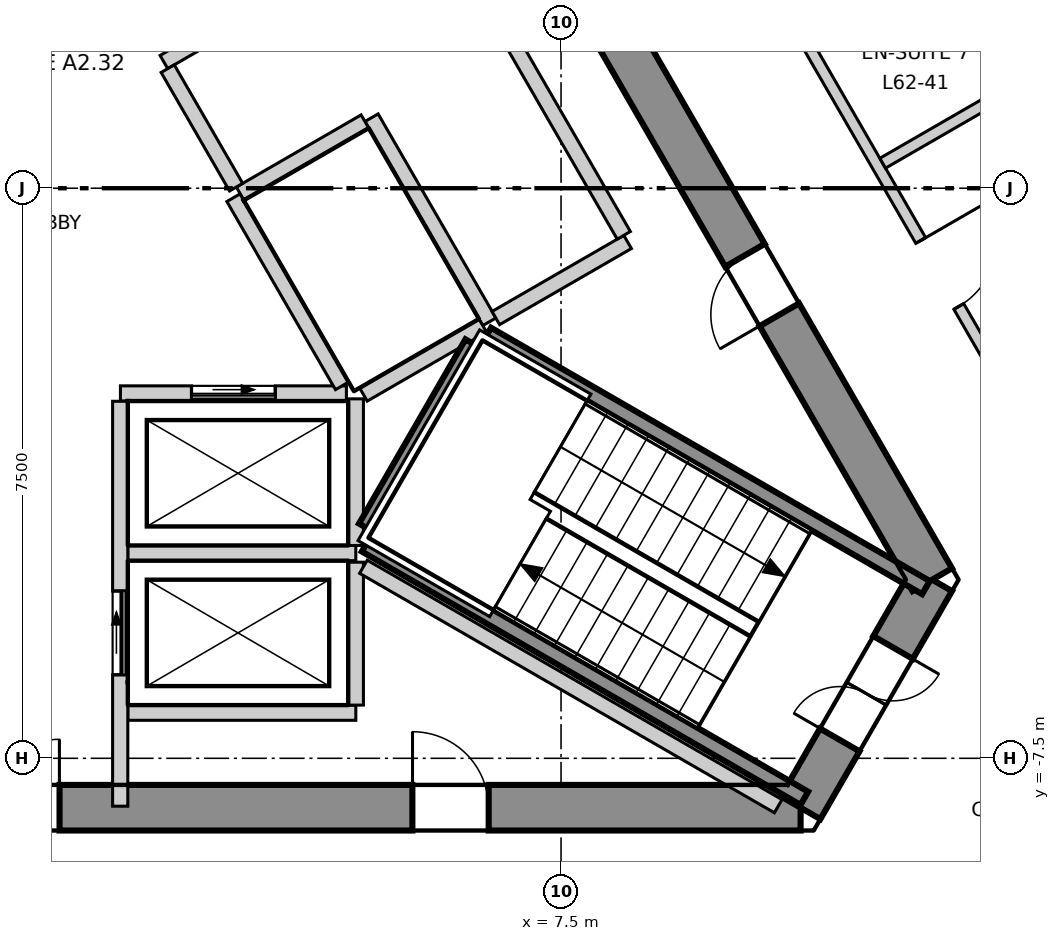
"""IFC4 building model, lengths in metres.
Left out: names, types, materials, properties, quantities, classifications, styles, units other than length and angle.
Written with IfcOpenShell. Run it as: python <this file> out.ifc"""

import sys

from ifc_helpers import new_model, si_unit, direction, frame, frame_2d, origin, place, context, subcontext, project, spatial, polyline, rectangle, outline, extrude, element, fill, save


model = new_model("IFC4")
c1 = context("Model", 3, precision=1e-05, world=origin(), true_north=direction((0.0, 1.0)))
c2 = subcontext(c1, "Body", "Model", "MODEL_VIEW")
j1 = project(units=[si_unit("LENGTHUNIT", "METRE"), si_unit("PLANEANGLEUNIT", "RADIAN")], contexts=[c1])
p1 = place(None, origin())
s1 = spatial("IfcSite", under=j1, at=p1, CompositionType="ELEMENT")
p2 = place(p1, origin())
s2 = spatial("IfcBuilding", under=s1, at=p2, CompositionType="ELEMENT")
p3 = place(p2, frame((0.0, 0.0, 268.3)))
s3 = spatial("IfcBuildingStorey", under=s2, at=p3, CompositionType="ELEMENT", Elevation=268.3)
p4 = place(p3, frame((-10.652, -8.15, -0.3), z_axis=(0.0, 0.0, 1.0), x_axis=(1.0, 0.0, 0.0)))
e1 = element("IfcWall", 1, at=p4, inside=s3, PredefinedType="SHEAR", context=c2, shape_type="SweptSolid", body=[
    extrude(outline(polyline([(-0.173, -0.3), (1.795, -0.3), (3.763, -0.3), (5.731, -0.3), (7.7, -0.3), (9.668, -0.3), (11.636, -0.3), (13.604, -0.3), (15.573, -0.3), (17.541, -0.3), (19.509, -0.3), (21.477, -0.3), (21.131, 0.3), (19.226, 0.3), (17.321, 0.3), (15.415, 0.3), (13.51, 0.3), (11.605, 0.3), (9.699, 0.3), (7.794, 0.3), (5.889, 0.3), (3.984, 0.3), (2.078, 0.3), (0.173, 0.3), (-0.173, -0.3)])), origin(), (0.0, 0.0, 1.0), 3.6),
])
p5 = place(p4, frame((9.752, 0.0, 0.3)))
e2 = element("IfcOpeningElement", 2, at=p5, cuts=e1, PredefinedType="OPENING", context=c2, shape_type="SweptSolid", body=[
    extrude(rectangle(XDim=1.8, YDim=2.1, at=frame_2d((0.9, 1.05))), frame((0.0, 0.31, 0.0), z_axis=(0.0, -1.0, 0.0), x_axis=(1.0, 0.0, 0.0)), (0.0, 0.0, 1.0), 0.62),
])
p6 = place(p4, frame((4.026, 0.0, 0.3)))
e3 = element("IfcOpeningElement", 3, at=p6, cuts=e1, PredefinedType="OPENING", context=c2, shape_type="SweptSolid", body=[
    extrude(rectangle(XDim=0.9, YDim=2.1, at=frame_2d((0.45, 1.05))), frame((0.0, 0.31, 0.0), z_axis=(0.0, -1.0, 0.0), x_axis=(1.0, 0.0, 0.0)), (0.0, 0.0, 1.0), 0.62),
])
p7 = place(p4, frame((16.198, 0.0, 0.3)))
e4 = element("IfcOpeningElement", 4, at=p7, cuts=e1, PredefinedType="OPENING", context=c2, shape_type="SweptSolid", body=[
    extrude(rectangle(XDim=1.0, YDim=2.1, at=frame_2d((0.5, 1.05))), frame((0.0, 0.31, 0.0), z_axis=(0.0, -1.0, 0.0), x_axis=(1.0, 0.0, 0.0)), (0.0, 0.0, 1.0), 0.62),
])
p8 = place(p3, frame((10.652, -8.15, -0.3), z_axis=(0.0, 0.0, 1.0), x_axis=(0.49997462182, 0.866040055388, 0.0)))
e5 = element("IfcWall", 5, at=p8, inside=s3, PredefinedType="SHEAR", context=c2, shape_type="SweptSolid", body=[
    extrude(outline(polyline([(-0.173, -0.3), (1.732, -0.301), (3.638, -0.301), (3.291, 0.3), (1.732, 0.3), (0.173, 0.3), (-0.173, -0.3)])), origin(), (0.0, 0.0, 1.0), 3.6),
])
p9 = place(p8, frame((1.032, 0.0, 0.3)))
e6 = element("IfcOpeningElement", 6, at=p9, cuts=e5, PredefinedType="OPENING", context=c2, shape_type="SweptSolid", body=[
    extrude(rectangle(XDim=1.4, YDim=2.1, at=frame_2d((0.7, 1.05))), frame((0.0, 0.31, 0.0), z_axis=(0.0, -1.0, 0.0), x_axis=(1.0, 0.0, 0.0)), (0.0, 0.0, 1.0), 0.621),
])
p10 = place(p3, frame((12.384, -5.15, -0.3), z_axis=(0.0, 0.0, 1.0), x_axis=(-0.500000539815, 0.866025092122, 0.0)))
e7 = element("IfcWall", 7, at=p10, inside=s3, PredefinedType="SHEAR", context=c2, shape_type="SweptSolid", body=[
    extrude(outline(polyline([(-0.173, -0.301), (1.795, -0.301), (3.763, -0.301), (5.731, -0.301), (7.7, -0.301), (9.668, -0.301), (11.636, -0.301), (13.604, -0.3), (15.573, -0.3), (17.541, -0.3), (19.509, -0.3), (21.477, -0.3), (21.131, 0.3), (19.226, 0.3), (17.321, 0.3), (15.415, 0.3), (13.51, 0.3), (11.605, 0.3), (9.699, 0.3), (7.794, 0.3), (5.889, 0.3), (3.984, 0.3), (2.078, 0.3), (0.173, 0.3), (-0.173, -0.301)])), origin(), (0.0, 0.0, 1.0), 3.6),
])
p11 = place(p10, frame((15.627, 0.0, 0.3)))
e8 = element("IfcOpeningElement", 8, at=p11, cuts=e7, PredefinedType="OPENING", context=c2, shape_type="SweptSolid", body=[
    extrude(rectangle(XDim=0.9, YDim=2.1, at=frame_2d((0.45, 1.05))), frame((0.0, 0.31, 0.0), z_axis=(0.0, -1.0, 0.0), x_axis=(1.0, 0.0, 0.0)), (0.0, 0.0, 1.0), 0.621),
])
p12 = place(p10, frame((4.026, 0.0, 0.3)))
e9 = element("IfcOpeningElement", 9, at=p12, cuts=e7, PredefinedType="OPENING", context=c2, shape_type="SweptSolid", body=[
    extrude(rectangle(XDim=0.9, YDim=2.1, at=frame_2d((0.45, 1.05))), frame((0.0, 0.31, 0.0), z_axis=(0.0, -1.0, 0.0), x_axis=(1.0, 0.0, 0.0)), (0.0, 0.0, 1.0), 0.621),
])
p13 = place(p3, frame((26.205, -12.154, 0.0), z_axis=(0.0, 0.0, 1.0), x_axis=(-0.49999909388, 0.866025926932, 0.0)))
e10 = element("IfcWall", 10, at=p13, inside=s3, PredefinedType="ELEMENTEDWALL", context=c2, shape_type="SweptSolid", body=[
    extrude(rectangle(XDim=47.236, YDim=0.2, at=frame_2d((23.618, 0.0))), origin(), (0.0, 0.0, 1.0), 3.3),
])
p14 = place(p13, frame((2.243, 0.0, 0.9)))
e11 = element("IfcOpeningElement", 11, at=p14, cuts=e10, PredefinedType="OPENING", context=c2, shape_type="SweptSolid", body=[
    extrude(rectangle(XDim=3.7, YDim=2.2, at=frame_2d((1.85, 1.1))), frame((0.0, 0.11, 0.0), z_axis=(0.0, -1.0, 0.0), x_axis=(1.0, 0.0, 0.0)), (0.0, 0.0, 1.0), 0.22),
])
p15 = place(p13, frame((7.825, 0.0, 0.9)))
e12 = element("IfcOpeningElement", 12, at=p15, cuts=e10, PredefinedType="OPENING", context=c2, shape_type="SweptSolid", body=[
    extrude(rectangle(XDim=3.7, YDim=2.2, at=frame_2d((1.85, 1.1))), frame((0.0, 0.11, 0.0), z_axis=(0.0, -1.0, 0.0), x_axis=(1.0, 0.0, 0.0)), (0.0, 0.0, 1.0), 0.22),
])
p16 = place(p13, frame((13.406, 0.0, 0.9)))
e13 = element("IfcOpeningElement", 13, at=p16, cuts=e10, PredefinedType="OPENING", context=c2, shape_type="SweptSolid", body=[
    extrude(rectangle(XDim=3.7, YDim=2.2, at=frame_2d((1.85, 1.1))), frame((0.0, 0.11, 0.0), z_axis=(0.0, -1.0, 0.0), x_axis=(1.0, 0.0, 0.0)), (0.0, 0.0, 1.0), 0.22),
])
p17 = place(p13, frame((18.987, 0.0, 0.9)))
e14 = element("IfcOpeningElement", 14, at=p17, cuts=e10, PredefinedType="OPENING", context=c2, shape_type="SweptSolid", body=[
    extrude(rectangle(XDim=3.7, YDim=2.2, at=frame_2d((1.85, 1.1))), frame((0.0, 0.11, 0.0), z_axis=(0.0, -1.0, 0.0), x_axis=(1.0, 0.0, 0.0)), (0.0, 0.0, 1.0), 0.22),
])
p18 = place(p13, frame((24.569, 0.0, 0.9)))
e15 = element("IfcOpeningElement", 15, at=p18, cuts=e10, PredefinedType="OPENING", context=c2, shape_type="SweptSolid", body=[
    extrude(rectangle(XDim=3.7, YDim=2.2, at=frame_2d((1.85, 1.1))), frame((0.0, 0.11, 0.0), z_axis=(0.0, -1.0, 0.0), x_axis=(1.0, 0.0, 0.0)), (0.0, 0.0, 1.0), 0.22),
])
p19 = place(p13, frame((30.15, 0.0, 0.9)))
e16 = element("IfcOpeningElement", 16, at=p19, cuts=e10, PredefinedType="OPENING", context=c2, shape_type="SweptSolid", body=[
    extrude(rectangle(XDim=3.7, YDim=2.2, at=frame_2d((1.85, 1.1))), frame((0.0, 0.11, 0.0), z_axis=(0.0, -1.0, 0.0), x_axis=(1.0, 0.0, 0.0)), (0.0, 0.0, 1.0), 0.22),
])
p20 = place(p13, frame((35.732, 0.0, 0.9)))
e17 = element("IfcOpeningElement", 17, at=p20, cuts=e10, PredefinedType="OPENING", context=c2, shape_type="SweptSolid", body=[
    extrude(rectangle(XDim=3.7, YDim=2.2, at=frame_2d((1.85, 1.1))), frame((0.0, 0.11, 0.0), z_axis=(0.0, -1.0, 0.0), x_axis=(1.0, 0.0, 0.0)), (0.0, 0.0, 1.0), 0.22),
])
p21 = place(p13, frame((41.313, 0.0, 0.9)))
e18 = element("IfcOpeningElement", 18, at=p21, cuts=e10, PredefinedType="OPENING", context=c2, shape_type="SweptSolid", body=[
    extrude(rectangle(XDim=3.7, YDim=2.2, at=frame_2d((1.85, 1.1))), frame((0.0, 0.11, 0.0), z_axis=(0.0, -1.0, 0.0), x_axis=(1.0, 0.0, 0.0)), (0.0, 0.0, 1.0), 0.22),
])
p22 = place(p3, frame((0.075, 20.37, 0.0), z_axis=(0.0, 0.0, 1.0), x_axis=(0.499988971979, -0.866031770721, 0.0)))
e19 = element("IfcWall", 19, at=p22, inside=s3, PredefinedType="PARTITIONING", context=c2, shape_type="SweptSolid", body=[
    extrude(rectangle(XDim=35.207, YDim=0.15, at=frame_2d((17.604, 0.0))), origin(), (0.0, 0.0, 1.0), 3.3),
])
p23 = place(p22, frame((31.606, 0.0, 0.0)))
e20 = element("IfcOpeningElement", 20, at=p23, cuts=e19, PredefinedType="OPENING", context=c2, shape_type="SweptSolid", body=[
    extrude(rectangle(XDim=1.0, YDim=2.1, at=frame_2d((0.5, 1.05))), frame((0.0, 0.085, 0.0), z_axis=(0.0, -1.0, 0.0), x_axis=(1.0, 0.0, 0.0)), (0.0, 0.0, 1.0), 0.17),
])
p24 = place(p22, frame((24.316, 0.0, 0.0)))
e21 = element("IfcOpeningElement", 21, at=p24, cuts=e19, PredefinedType="OPENING", context=c2, shape_type="SweptSolid", body=[
    extrude(rectangle(XDim=1.0, YDim=2.1, at=frame_2d((0.5, 1.05))), frame((0.0, 0.085, 0.0), z_axis=(0.0, -1.0, 0.0), x_axis=(1.0, 0.0, 0.0)), (0.0, 0.0, 1.0), 0.17),
])
p25 = place(p22, frame((18.735, 0.0, 0.0)))
e22 = element("IfcOpeningElement", 22, at=p25, cuts=e19, PredefinedType="OPENING", context=c2, shape_type="SweptSolid", body=[
    extrude(rectangle(XDim=1.0, YDim=2.1, at=frame_2d((0.5, 1.05))), frame((0.0, 0.085, 0.0), z_axis=(0.0, -1.0, 0.0), x_axis=(1.0, 0.0, 0.0)), (0.0, 0.0, 1.0), 0.17),
])
p26 = place(p22, frame((8.154, 0.0, 0.0)))
e23 = element("IfcOpeningElement", 23, at=p26, cuts=e19, PredefinedType="OPENING", context=c2, shape_type="SweptSolid", body=[
    extrude(rectangle(XDim=1.0, YDim=2.1, at=frame_2d((0.5, 1.05))), frame((0.0, 0.085, 0.0), z_axis=(0.0, -1.0, 0.0), x_axis=(1.0, 0.0, 0.0)), (0.0, 0.0, 1.0), 0.17),
])
p27 = place(p22, frame((13.754, 0.0, 0.0)))
e24 = element("IfcOpeningElement", 24, at=p27, cuts=e19, PredefinedType="OPENING", context=c2, shape_type="SweptSolid", body=[
    extrude(rectangle(XDim=0.9, YDim=2.1, at=frame_2d((0.45, 1.05))), frame((0.0, 0.085, 0.0), z_axis=(0.0, -1.0, 0.0), x_axis=(1.0, 0.0, 0.0)), (0.0, 0.0, 1.0), 0.17),
])
p28 = place(p22, frame((11.554, 0.0, 0.0)))
e25 = element("IfcOpeningElement", 25, at=p28, cuts=e19, PredefinedType="OPENING", context=c2, shape_type="SweptSolid", body=[
    extrude(rectangle(XDim=0.9, YDim=2.1, at=frame_2d((0.45, 1.05))), frame((0.0, 0.085, 0.0), z_axis=(0.0, -1.0, 0.0), x_axis=(1.0, 0.0, 0.0)), (0.0, 0.0, 1.0), 0.17),
])
p29 = place(p22, frame((2.69, 0.0, 0.0)))
e26 = element("IfcOpeningElement", 26, at=p29, cuts=e19, PredefinedType="OPENING", context=c2, shape_type="SweptSolid", body=[
    extrude(rectangle(XDim=1.0, YDim=2.1, at=frame_2d((0.5, 1.05))), frame((0.0, 0.085, 0.0), z_axis=(0.0, -1.0, 0.0), x_axis=(1.0, 0.0, 0.0)), (0.0, 0.0, 1.0), 0.17),
])
p30 = place(p3, frame((11.732, 0.329, 0.0), z_axis=(0.0, 0.0, 1.0), x_axis=(0.866043575568, 0.499968524226, 0.0)))
e27 = element("IfcWall", 27, at=p30, inside=s3, PredefinedType="PARTITIONING", context=c2, shape_type="SweptSolid", body=[
    extrude(rectangle(XDim=6.212, YDim=0.15, at=frame_2d((3.106, 0.0))), origin(), (0.0, 0.0, 1.0), 3.3),
])
p31 = place(p3, frame((12.856, 3.633, 0.0), z_axis=(0.0, 0.0, 1.0), x_axis=(0.500023359282, -0.866011916877, 0.0)))
e28 = element("IfcWall", 28, at=p31, inside=s3, PredefinedType="PARTITIONING", context=c2, shape_type="SweptSolid", body=[
    extrude(rectangle(XDim=2.224, YDim=0.15, at=frame_2d((1.112, 0.0))), origin(), (0.0, 0.0, 1.0), 3.3),
])
for number, where, z_axis, x_axis in (
    (29, (1.8, -6.9, 0.0), (0.0, 0.0, 1.0), (1.0, 0.0, 0.0)),
    (30, (1.8, -4.8, 0.0), (0.0, 0.0, 1.0), (1.0, 0.0, 0.0)),
):
    element("IfcWall", number, at=place(p3, frame(where, z_axis=z_axis, x_axis=x_axis)), inside=s3, PredefinedType="SOLIDWALL", context=c2, shape_type="SweptSolid", body=[
        extrude(rectangle(XDim=3.0, YDim=0.2, at=frame_2d((1.5, 0.0))), origin(), (0.0, 0.0, 1.0), 3.3),
    ])
p32 = place(p3, frame((1.703, -2.7, 0.0), z_axis=(0.0, 0.0, 1.0), x_axis=(1.0, 0.0, 0.0)))
e31 = element("IfcWall", 31, at=p32, inside=s3, PredefinedType="SOLIDWALL", context=c2, shape_type="SweptSolid", body=[
    extrude(rectangle(XDim=2.973, YDim=0.2, at=frame_2d((1.487, 0.0))), origin(), (0.0, 0.0, 1.0), 3.3),
])
p33 = place(p32, frame((0.936, 0.0, 0.0)))
e32 = element("IfcOpeningElement", 32, at=p33, cuts=e31, PredefinedType="OPENING", context=c2, shape_type="SweptSolid", body=[
    extrude(rectangle(XDim=1.1, YDim=2.1, at=frame_2d((0.55, 1.05))), frame((0.0, 0.11, 0.0), z_axis=(0.0, -1.0, 0.0), x_axis=(1.0, 0.0, 0.0)), (0.0, 0.0, 1.0), 0.22),
])
p34 = place(p3, frame((3.19, -0.125, 0.0), z_axis=(0.0, 0.0, 1.0), x_axis=(0.499988658015, -0.866031951983, 0.0)))
e33 = element("IfcWall", 33, at=p34, inside=s3, PredefinedType="SOLIDWALL", context=c2, shape_type="SweptSolid", body=[
    extrude(rectangle(XDim=2.858, YDim=0.2, at=frame_2d((1.429, 0.0))), origin(), (0.0, 0.0, 1.0), 3.3),
])
p35 = place(p3, frame((1.7, -8.13, 0.0), z_axis=(0.0, 0.0, 1.0), x_axis=(0.0, 1.0, 0.0)))
e34 = element("IfcWall", 34, at=p35, inside=s3, PredefinedType="SOLIDWALL", context=c2, shape_type="SweptSolid", body=[
    extrude(rectangle(XDim=5.327, YDim=0.2, at=frame_2d((2.664, 0.0))), origin(), (0.0, 0.0, 1.0), 3.3),
])
p36 = place(p35, frame((1.73, 0.0, 0.0)))
e35 = element("IfcOpeningElement", 35, at=p36, cuts=e34, PredefinedType="OPENING", context=c2, shape_type="SweptSolid", body=[
    extrude(rectangle(XDim=1.1, YDim=2.1, at=frame_2d((0.55, 1.05))), frame((0.0, 0.11, 0.0), z_axis=(0.0, -1.0, 0.0), x_axis=(1.0, 0.0, 0.0)), (0.0, 0.0, 1.0), 0.22),
])
p37 = place(p3, frame((4.8, -6.8, 0.0), z_axis=(0.0, 0.0, 1.0), x_axis=(0.0, 1.0, 0.0)))
e36 = element("IfcWall", 36, at=p37, inside=s3, PredefinedType="SOLIDWALL", context=c2, shape_type="SweptSolid", body=[
    extrude(rectangle(XDim=1.88, YDim=0.2, at=frame_2d((0.94, 0.0))), origin(), (0.0, 0.0, 1.0), 3.3),
])
p38 = place(p3, frame((4.8, -4.7, 0.0), z_axis=(0.0, 0.0, 1.0), x_axis=(0.0, 1.0, 0.0)))
e37 = element("IfcWall", 37, at=p38, inside=s3, PredefinedType="SOLIDWALL", context=c2, shape_type="SweptSolid", body=[
    extrude(rectangle(XDim=1.929, YDim=0.2, at=frame_2d((0.964, 0.0))), origin(), (0.0, 0.0, 1.0), 3.3),
])
p39 = place(p3, frame((5.007, 0.928, 0.0), z_axis=(0.0, 0.0, 1.0), x_axis=(0.499899694197, -0.866083307622, 0.0)))
e38 = element("IfcWall", 38, at=p39, inside=s3, PredefinedType="SOLIDWALL", context=c2, shape_type="SweptSolid", body=[
    extrude(rectangle(XDim=3.1, YDim=0.2, at=frame_2d((1.55, 0.0))), origin(), (0.0, 0.0, 1.0), 3.3),
])
p40 = place(p3, frame((3.278, -0.071, 0.0), z_axis=(0.0, 0.0, 1.0), x_axis=(0.865784509405, 0.500417009377, 0.0)))
e39 = element("IfcWall", 39, at=p40, inside=s3, PredefinedType="SOLIDWALL", context=c2, shape_type="SweptSolid", body=[
    extrude(rectangle(XDim=1.896, YDim=0.2, at=frame_2d((0.948, 0.0))), origin(), (0.0, 0.0, 1.0), 3.3),
])
p41 = place(p3, frame((2.275, 1.66, 0.0), z_axis=(0.0, 0.0, 1.0), x_axis=(0.866013608182, 0.500020430026, 0.0)))
e40 = element("IfcWall", 40, at=p41, inside=s3, PredefinedType="SOLIDWALL", context=c2, shape_type="SweptSolid", body=[
    extrude(rectangle(XDim=4.35, YDim=0.2, at=frame_2d((2.175, 0.0))), origin(), (0.0, 0.0, 1.0), 3.3),
])
p42 = place(p3, frame((2.325, 1.573, 0.0), z_axis=(0.0, 0.0, 1.0), x_axis=(0.500004188491, -0.866022985545, 0.0)))
e41 = element("IfcWall", 41, at=p42, inside=s3, PredefinedType="SOLIDWALL", context=c2, shape_type="SweptSolid", body=[
    extrude(rectangle(XDim=1.8, YDim=0.2, at=frame_2d((0.9, 0.0))), origin(), (0.0, 0.0, 1.0), 3.3),
])
p43 = place(p3, frame((4.9, -2.714, 0.0), z_axis=(0.0, 0.0, 1.0), x_axis=(0.865846928409, 0.500309001083, 0.0)))
e42 = element("IfcWall", 42, at=p43, inside=s3, PredefinedType="SOLIDWALL", context=c2, shape_type="SweptSolid", body=[
    extrude(rectangle(XDim=1.813, YDim=0.2, at=frame_2d((0.907, 0.0))), origin(), (0.0, 0.0, 1.0), 3.3),
])
p44 = place(p3, frame((4.9, -4.98, 0.0), z_axis=(0.0, 0.0, 1.0), x_axis=(0.866074613031, -0.499914757397, 0.0)))
e43 = element("IfcWall", 43, at=p44, inside=s3, PredefinedType="SOLIDWALL", context=c2, shape_type="SweptSolid", body=[
    extrude(rectangle(XDim=6.301, YDim=0.2, at=frame_2d((3.15, 0.0))), origin(), (0.0, 0.0, 1.0), 3.3),
])
p45 = place(p3, frame((6.642, -1.708, 0.0), z_axis=(0.0, 0.0, 1.0), x_axis=(0.866043441391, 0.499968756647, 0.0)))
e44 = element("IfcWall", 44, at=p45, inside=s3, PredefinedType="SOLIDWALL", context=c2, shape_type="SweptSolid", body=[
    extrude(rectangle(XDim=2.002, YDim=0.2, at=frame_2d((1.001, 0.0))), origin(), (0.0, 0.0, 1.0), 3.3),
])
p46 = place(p3, frame((6.826, 1.978, 0.0), z_axis=(0.0, 0.0, 1.0), x_axis=(0.499990139034, -0.866031096941, 0.0)))
e45 = element("IfcWall", 45, at=p46, inside=s3, PredefinedType="SOLIDWALL", context=c2, shape_type="SweptSolid", body=[
    extrude(rectangle(XDim=3.0, YDim=0.2, at=frame_2d((1.5, 0.0))), origin(), (0.0, 0.0, 1.0), 3.3),
])
p47 = place(p3, frame((4.929, -4.693, 0.0), z_axis=(0.0, 0.0, 1.0), x_axis=(0.866005022404, -0.500035299925, 0.0)))
e46 = element("IfcWall", 46, at=p47, inside=s3, PredefinedType="SOLIDWALL", context=c2, shape_type="SweptSolid", body=[
    extrude(rectangle(XDim=6.665, YDim=0.2, at=frame_2d((3.333, 0.0))), origin(), (0.0, 0.0, 1.0), 3.3),
])
p48 = place(p3, frame((4.929, -4.462, 0.0), z_axis=(0.0, 0.0, 1.0), x_axis=(0.500200581029, 0.865909567298, 0.0)))
e47 = element("IfcWall", 47, at=p48, inside=s3, PredefinedType="SOLIDWALL", context=c2, shape_type="SweptSolid", body=[
    extrude(rectangle(XDim=2.799, YDim=0.2, at=frame_2d((1.399, 0.0))), origin(), (0.0, 0.0, 1.0), 3.3),
])
p49 = place(p3, frame((6.529, -1.922, 0.0), z_axis=(0.0, 0.0, 1.0), x_axis=(0.866068467981, -0.499925403204, 0.0)))
e48 = element("IfcWall", 48, at=p49, inside=s3, PredefinedType="SOLIDWALL", context=c2, shape_type="SweptSolid", body=[
    extrude(rectangle(XDim=6.665, YDim=0.2, at=frame_2d((3.332, 0.0))), origin(), (0.0, 0.0, 1.0), 3.3),
])
p50 = place(p33, origin())
e49 = element("IfcDoor", 49, at=p50, inside=s3, OperationType="SLIDING_TO_LEFT", PredefinedType="DOOR", context=c2, shape_type="SweptSolid", body=[
    extrude(rectangle(XDim=1.1, YDim=2.1, at=frame_2d((0.55, 1.05))), frame((0.0, 0.025, 0.0), z_axis=(0.0, -1.0, 0.0), x_axis=(1.0, 0.0, 0.0)), (0.0, 0.0, 1.0), 0.05),
])
fill(e32, e49)
p51 = place(p36, origin())
e50 = element("IfcDoor", 50, at=p51, inside=s3, OperationType="SLIDING_TO_LEFT", PredefinedType="DOOR", context=c2, shape_type="SweptSolid", body=[
    extrude(rectangle(XDim=1.1, YDim=2.1, at=frame_2d((0.55, 1.05))), frame((0.0, 0.025, 0.0), z_axis=(0.0, -1.0, 0.0), x_axis=(1.0, 0.0, 0.0)), (0.0, 0.0, 1.0), 0.05),
])
fill(e35, e50)
p52 = place(p24, origin())
e51 = element("IfcDoor", 51, at=p52, inside=s3, OperationType="SINGLE_SWING_RIGHT", PredefinedType="DOOR", context=c2, shape_type="SweptSolid", body=[
    extrude(rectangle(XDim=1.0, YDim=2.1, at=frame_2d((0.5, 1.05))), frame((0.0, 0.025, 0.0), z_axis=(0.0, -1.0, 0.0), x_axis=(1.0, 0.0, 0.0)), (0.0, 0.0, 1.0), 0.05),
])
fill(e21, e51)
p53 = place(p5, origin())
e52 = element("IfcDoor", 52, at=p53, inside=s3, OperationType="DOUBLE_DOOR_SINGLE_SWING", PredefinedType="DOOR", context=c2, shape_type="SweptSolid", body=[
    extrude(rectangle(XDim=1.8, YDim=2.1, at=frame_2d((0.9, 1.05))), frame((0.0, 0.025, 0.0), z_axis=(0.0, -1.0, 0.0), x_axis=(1.0, 0.0, 0.0)), (0.0, 0.0, 1.0), 0.05),
])
fill(e2, e52)
p54 = place(p9, origin())
e53 = element("IfcDoor", 53, at=p54, inside=s3, OperationType="DOUBLE_DOOR_SINGLE_SWING", PredefinedType="DOOR", context=c2, shape_type="SweptSolid", body=[
    extrude(rectangle(XDim=1.4, YDim=2.1, at=frame_2d((0.7, 1.05))), frame((0.0, 0.025, 0.0), z_axis=(0.0, -1.0, 0.0), x_axis=(1.0, 0.0, 0.0)), (0.0, 0.0, 1.0), 0.05),
])
fill(e6, e53)
p55 = place(p7, origin())
e54 = element("IfcDoor", 54, at=p55, inside=s3, OperationType="SINGLE_SWING_RIGHT", PredefinedType="DOOR", context=c2, shape_type="SweptSolid", body=[
    extrude(rectangle(XDim=1.0, YDim=2.1, at=frame_2d((0.5, 1.05))), frame((0.0, 0.025, 0.0), z_axis=(0.0, -1.0, 0.0), x_axis=(1.0, 0.0, 0.0)), (0.0, 0.0, 1.0), 0.05),
])
fill(e4, e54)
p56 = place(p12, origin())
e55 = element("IfcDoor", 55, at=p56, inside=s3, OperationType="SINGLE_SWING_RIGHT", PredefinedType="DOOR", context=c2, shape_type="SweptSolid", body=[
    extrude(rectangle(XDim=0.9, YDim=2.1, at=frame_2d((0.45, 1.05))), frame((0.0, 0.025, 0.0), z_axis=(0.0, -1.0, 0.0), x_axis=(1.0, 0.0, 0.0)), (0.0, 0.0, 1.0), 0.05),
])
fill(e9, e55)
save(model, sys.argv[1])
